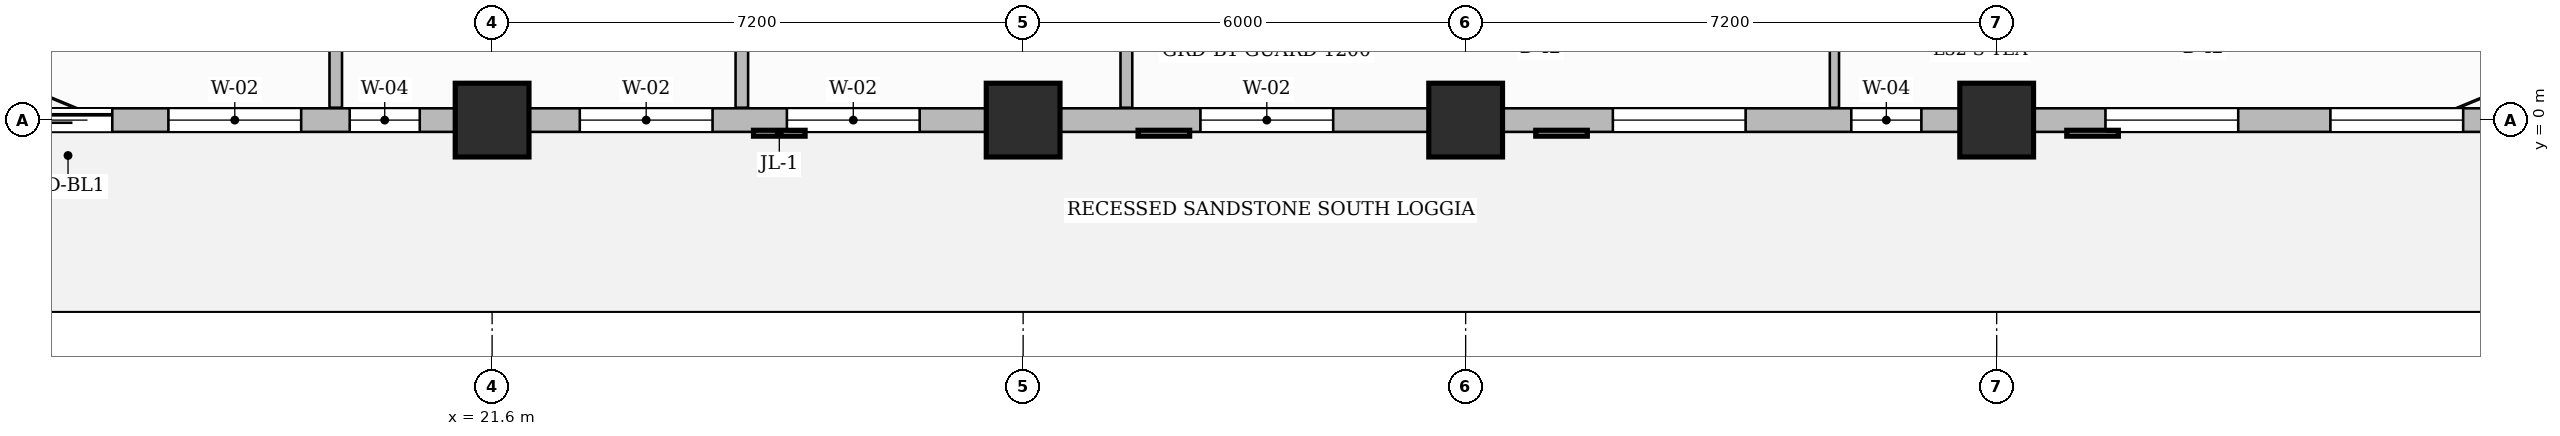
"""IFC4 building model, lengths in metres.
Left out: names, types, materials, properties, quantities, classifications, styles, units other than length and angle.
Written with IfcOpenShell. Run it as: python <this file> out.ifc"""

import sys

from ifc_helpers import new_model, si_unit, direction, frame, frame_2d, origin, origin_2d, place, context, subcontext, project, spatial, rectangle, extrude, source, transform, mapped, element, fill, save


model = new_model("IFC4")
c1 = context("Model", 3, precision=1e-05, world=origin(), true_north=direction((0.0, 1.0)))
c2 = subcontext(c1, "Body", "Model", "MODEL_VIEW")
j1 = project(units=[si_unit("LENGTHUNIT", "METRE"), si_unit("PLANEANGLEUNIT", "RADIAN")], contexts=[c1])
p1 = place(None, origin())
s1 = spatial("IfcSite", under=j1, at=p1, CompositionType="ELEMENT")
p2 = place(p1, origin())
s2 = spatial("IfcBuilding", under=s1, at=p2, CompositionType="ELEMENT")
p3 = place(p2, frame((0.0, 0.0, 130.3)))
s3 = spatial("IfcBuildingStorey", under=s2, at=p3, CompositionType="ELEMENT", Elevation=130.3)
m1 = source(origin(), c2, "Body", "SweptSolid", [
    extrude(rectangle(XDim=1.0, YDim=1.0, at=origin_2d()), origin(), (0.0, 0.0, 1.0), 3.7),
])
for number, where, z_axis, x_axis in (
    (1, (21.6, 0.0, 0.0), (0.0, 0.0, 1.0), (1.0, 0.0, 0.0)),
    (2, (28.8, 0.0, 0.0), (0.0, 0.0, 1.0), (1.0, 0.0, 0.0)),
    (3, (34.8, 0.0, 0.0), (0.0, 0.0, 1.0), (1.0, 0.0, 0.0)),
    (4, (42.0, 0.0, 0.0), (0.0, 0.0, 1.0), (1.0, 0.0, 0.0)),
):
    element("IfcColumn", number, at=place(p3, frame(where, z_axis=z_axis, x_axis=x_axis)), inside=s3, PredefinedType="COLUMN", context=c2, shape_type="MappedRepresentation", body=[
        mapped(m1, transform((0.0, 0.0, 0.0), scale=1.0)),
    ])
p4 = place(p3, frame((30.2, 0.168, 0.0), z_axis=(0.0, 0.0, 1.0), x_axis=(0.0, 1.0, 0.0)))
e5 = element("IfcWall", 5, at=p4, inside=s3, PredefinedType="PARTITIONING", context=c2, shape_type="SweptSolid", body=[
    extrude(rectangle(XDim=9.292, YDim=0.16, at=frame_2d((4.646, 0.0))), origin(), (0.0, 0.0, 1.0), 3.45),
])
p5 = place(p4, frame((1.957, 0.0, 0.0)))
e6 = element("IfcOpeningElement", 6, at=p5, cuts=e5, PredefinedType="OPENING", context=c2, shape_type="SweptSolid", body=[
    extrude(rectangle(XDim=1.05, YDim=2.15, at=frame_2d((0.525, 1.075))), frame((0.0, 0.09, 0.0), z_axis=(0.0, -1.0, 0.0), x_axis=(1.0, 0.0, 0.0)), (0.0, 0.0, 1.0), 0.18),
])
p6 = place(p3, frame((39.8, 0.168, 0.0), z_axis=(0.0, 0.0, 1.0), x_axis=(0.0, 1.0, 0.0)))
e7 = element("IfcWall", 7, at=p6, inside=s3, PredefinedType="PARTITIONING", context=c2, shape_type="SweptSolid", body=[
    extrude(rectangle(XDim=1.542, YDim=0.125, at=frame_2d((0.771, 0.0))), origin(), (0.0, 0.0, 1.0), 3.45),
])
p7 = place(p3, frame((19.48, 0.168, 0.0), z_axis=(0.0, 0.0, 1.0), x_axis=(0.0, 1.0, 0.0)))
e8 = element("IfcWall", 8, at=p7, inside=s3, PredefinedType="PARTITIONING", context=c2, shape_type="SweptSolid", body=[
    extrude(rectangle(XDim=9.292, YDim=0.17, at=frame_2d((4.646, 0.0))), origin(), (0.0, 0.0, 1.0), 3.45),
])
p8 = place(p3, frame((24.986, 0.168, 0.0), z_axis=(0.0, 0.0, 1.0), x_axis=(0.0, 1.0, 0.0)))
e9 = element("IfcWall", 9, at=p8, inside=s3, PredefinedType="PARTITIONING", context=c2, shape_type="SweptSolid", body=[
    extrude(rectangle(XDim=9.292, YDim=0.17, at=frame_2d((4.646, 0.0))), origin(), (0.0, 0.0, 1.0), 3.105),
])
p9 = place(p3, frame((14.4, 0.0, 0.0), z_axis=(0.0, 0.0, 1.0), x_axis=(1.0, 0.0, 0.0)))
e10 = element("IfcWall", 10, at=p9, inside=s3, PredefinedType="SOLIDWALL", context=c2, shape_type="SweptSolid", body=[
    extrude(rectangle(XDim=35.4, YDim=0.32, at=frame_2d((17.7, 0.0))), origin(), (0.0, 0.0, 1.0), 2.935),
])
p10 = place(p9, frame((0.85, 0.0, 0.0)))
e11 = element("IfcOpeningElement", 11, at=p10, cuts=e10, PredefinedType="OPENING", context=c2, shape_type="SweptSolid", body=[
    extrude(rectangle(XDim=1.2, YDim=2.2, at=frame_2d((0.6, 1.1))), frame((0.0, 0.17, 0.0), z_axis=(0.0, -1.0, 0.0), x_axis=(1.0, 0.0, 0.0)), (0.0, 0.0, 1.0), 0.34),
])
p11 = place(p9, frame((2.811, 0.0, 0.8)))
e12 = element("IfcOpeningElement", 12, at=p11, cuts=e10, PredefinedType="OPENING", context=c2, shape_type="SweptSolid", body=[
    extrude(rectangle(XDim=1.8, YDim=1.85, at=frame_2d((0.9, 0.925))), frame((0.0, 0.17, 0.0), z_axis=(0.0, -1.0, 0.0), x_axis=(1.0, 0.0, 0.0)), (0.0, 0.0, 1.0), 0.34),
])
p12 = place(p9, frame((5.269, 0.0, 0.8)))
e13 = element("IfcOpeningElement", 13, at=p12, cuts=e10, PredefinedType="OPENING", context=c2, shape_type="SweptSolid", body=[
    extrude(rectangle(XDim=0.95, YDim=1.75, at=frame_2d((0.475, 0.875))), frame((0.0, 0.17, 0.0), z_axis=(0.0, -1.0, 0.0), x_axis=(1.0, 0.0, 0.0)), (0.0, 0.0, 1.0), 0.34),
])
p13 = place(p9, frame((8.389, 0.0, 0.8)))
e14 = element("IfcOpeningElement", 14, at=p13, cuts=e10, PredefinedType="OPENING", context=c2, shape_type="SweptSolid", body=[
    extrude(rectangle(XDim=1.8, YDim=1.85, at=frame_2d((0.9, 0.925))), frame((0.0, 0.17, 0.0), z_axis=(0.0, -1.0, 0.0), x_axis=(1.0, 0.0, 0.0)), (0.0, 0.0, 1.0), 0.34),
])
p14 = place(p9, frame((11.197, 0.0, 0.8)))
e15 = element("IfcOpeningElement", 15, at=p14, cuts=e10, PredefinedType="OPENING", context=c2, shape_type="SweptSolid", body=[
    extrude(rectangle(XDim=1.8, YDim=1.85, at=frame_2d((0.9, 0.925))), frame((0.0, 0.17, 0.0), z_axis=(0.0, -1.0, 0.0), x_axis=(1.0, 0.0, 0.0)), (0.0, 0.0, 1.0), 0.34),
])
p15 = place(p9, frame((16.804, 0.0, 0.8)))
e16 = element("IfcOpeningElement", 16, at=p15, cuts=e10, PredefinedType="OPENING", context=c2, shape_type="SweptSolid", body=[
    extrude(rectangle(XDim=1.8, YDim=1.85, at=frame_2d((0.9, 0.925))), frame((0.0, 0.17, 0.0), z_axis=(0.0, -1.0, 0.0), x_axis=(1.0, 0.0, 0.0)), (0.0, 0.0, 1.0), 0.34),
])
p16 = place(p9, frame((22.396, 0.0, 0.8)))
e17 = element("IfcOpeningElement", 17, at=p16, cuts=e10, PredefinedType="OPENING", context=c2, shape_type="SweptSolid", body=[
    extrude(rectangle(XDim=1.8, YDim=1.85, at=frame_2d((0.9, 0.925))), frame((0.0, 0.17, 0.0), z_axis=(0.0, -1.0, 0.0), x_axis=(1.0, 0.0, 0.0)), (0.0, 0.0, 1.0), 0.34),
])
p17 = place(p9, frame((25.629, 0.0, 0.8)))
e18 = element("IfcOpeningElement", 18, at=p17, cuts=e10, PredefinedType="OPENING", context=c2, shape_type="SweptSolid", body=[
    extrude(rectangle(XDim=0.95, YDim=1.75, at=frame_2d((0.475, 0.875))), frame((0.0, 0.17, 0.0), z_axis=(0.0, -1.0, 0.0), x_axis=(1.0, 0.0, 0.0)), (0.0, 0.0, 1.0), 0.34),
])
p18 = place(p9, frame((29.075, 0.0, 0.8)))
e19 = element("IfcOpeningElement", 19, at=p18, cuts=e10, PredefinedType="OPENING", context=c2, shape_type="SweptSolid", body=[
    extrude(rectangle(XDim=1.8, YDim=1.85, at=frame_2d((0.9, 0.925))), frame((0.0, 0.17, 0.0), z_axis=(0.0, -1.0, 0.0), x_axis=(1.0, 0.0, 0.0)), (0.0, 0.0, 1.0), 0.34),
])
p19 = place(p9, frame((32.125, 0.0, 0.8)))
e20 = element("IfcOpeningElement", 20, at=p19, cuts=e10, PredefinedType="OPENING", context=c2, shape_type="SweptSolid", body=[
    extrude(rectangle(XDim=1.8, YDim=1.85, at=frame_2d((0.9, 0.925))), frame((0.0, 0.17, 0.0), z_axis=(0.0, -1.0, 0.0), x_axis=(1.0, 0.0, 0.0)), (0.0, 0.0, 1.0), 0.34),
])
m2 = source(origin(), c2, "Body", "SweptSolid", [
    extrude(rectangle(XDim=1.2, YDim=2.2, at=frame_2d((0.6, 1.1))), frame((0.0, 0.025, 0.0), z_axis=(0.0, -1.0, 0.0), x_axis=(1.0, 0.0, 0.0)), (0.0, 0.0, 1.0), 0.05),
])
p20 = place(p10, origin())
e21 = element("IfcDoor", 21, at=p20, inside=s3, OperationType="SLIDING_TO_LEFT", PredefinedType="DOOR", context=c2, shape_type="MappedRepresentation", body=[
    mapped(m2, transform((0.0, 0.0, 0.0), scale=1.0)),
])
fill(e11, e21)
m3 = source(origin(), c2, "Body", "SweptSolid", [
    extrude(rectangle(XDim=1.8, YDim=1.85, at=frame_2d((0.9, 0.925))), frame((0.0, 0.03, 0.0), z_axis=(0.0, -1.0, 0.0), x_axis=(1.0, 0.0, 0.0)), (0.0, 0.0, 1.0), 0.06),
])
p21 = place(p11, origin())
e22 = element("IfcWindow", 22, at=p21, inside=s3, PartitioningType="DOUBLE_PANEL_VERTICAL", PredefinedType="WINDOW", context=c2, shape_type="MappedRepresentation", body=[
    mapped(m3, transform((0.0, 0.0, 0.0), scale=1.0)),
])
fill(e12, e22)
m4 = source(origin(), c2, "Body", "SweptSolid", [
    extrude(rectangle(XDim=0.95, YDim=1.75, at=frame_2d((0.475, 0.875))), frame((0.0, 0.03, 0.0), z_axis=(0.0, -1.0, 0.0), x_axis=(1.0, 0.0, 0.0)), (0.0, 0.0, 1.0), 0.06),
])
p22 = place(p12, origin())
e23 = element("IfcWindow", 23, at=p22, inside=s3, PartitioningType="SINGLE_PANEL", PredefinedType="WINDOW", context=c2, shape_type="MappedRepresentation", body=[
    mapped(m4, transform((0.0, 0.0, 0.0), scale=1.0)),
])
fill(e13, e23)
p23 = place(p13, origin())
e24 = element("IfcWindow", 24, at=p23, inside=s3, PartitioningType="DOUBLE_PANEL_VERTICAL", PredefinedType="WINDOW", context=c2, shape_type="MappedRepresentation", body=[
    mapped(m3, transform((0.0, 0.0, 0.0), scale=1.0)),
])
fill(e14, e24)
p24 = place(p14, origin())
e25 = element("IfcWindow", 25, at=p24, inside=s3, PartitioningType="DOUBLE_PANEL_VERTICAL", PredefinedType="WINDOW", context=c2, shape_type="MappedRepresentation", body=[
    mapped(m3, transform((0.0, 0.0, 0.0), scale=1.0)),
])
fill(e15, e25)
p25 = place(p15, origin())
e26 = element("IfcWindow", 26, at=p25, inside=s3, PartitioningType="DOUBLE_PANEL_VERTICAL", PredefinedType="WINDOW", context=c2, shape_type="MappedRepresentation", body=[
    mapped(m3, transform((0.0, 0.0, 0.0), scale=1.0)),
])
fill(e16, e26)
p26 = place(p16, origin())
e27 = element("IfcWindow", 27, at=p26, inside=s3, PartitioningType="DOUBLE_PANEL_VERTICAL", PredefinedType="WINDOW", context=c2, shape_type="MappedRepresentation", body=[
    mapped(m3, transform((0.0, 0.0, 0.0), scale=1.0)),
])
fill(e17, e27)
p27 = place(p17, origin())
e28 = element("IfcWindow", 28, at=p27, inside=s3, PartitioningType="SINGLE_PANEL", PredefinedType="WINDOW", context=c2, shape_type="MappedRepresentation", body=[
    mapped(m4, transform((0.0, 0.0, 0.0), scale=1.0)),
])
fill(e18, e28)
p28 = place(p18, origin())
e29 = element("IfcWindow", 29, at=p28, inside=s3, PartitioningType="DOUBLE_PANEL_VERTICAL", PredefinedType="WINDOW", context=c2, shape_type="MappedRepresentation", body=[
    mapped(m3, transform((0.0, 0.0, 0.0), scale=1.0)),
])
fill(e19, e29)
p29 = place(p19, origin())
e30 = element("IfcWindow", 30, at=p29, inside=s3, PartitioningType="DOUBLE_PANEL_VERTICAL", PredefinedType="WINDOW", context=c2, shape_type="MappedRepresentation", body=[
    mapped(m3, transform((0.0, 0.0, 0.0), scale=1.0)),
])
fill(e20, e30)
save(model, sys.argv[1])
